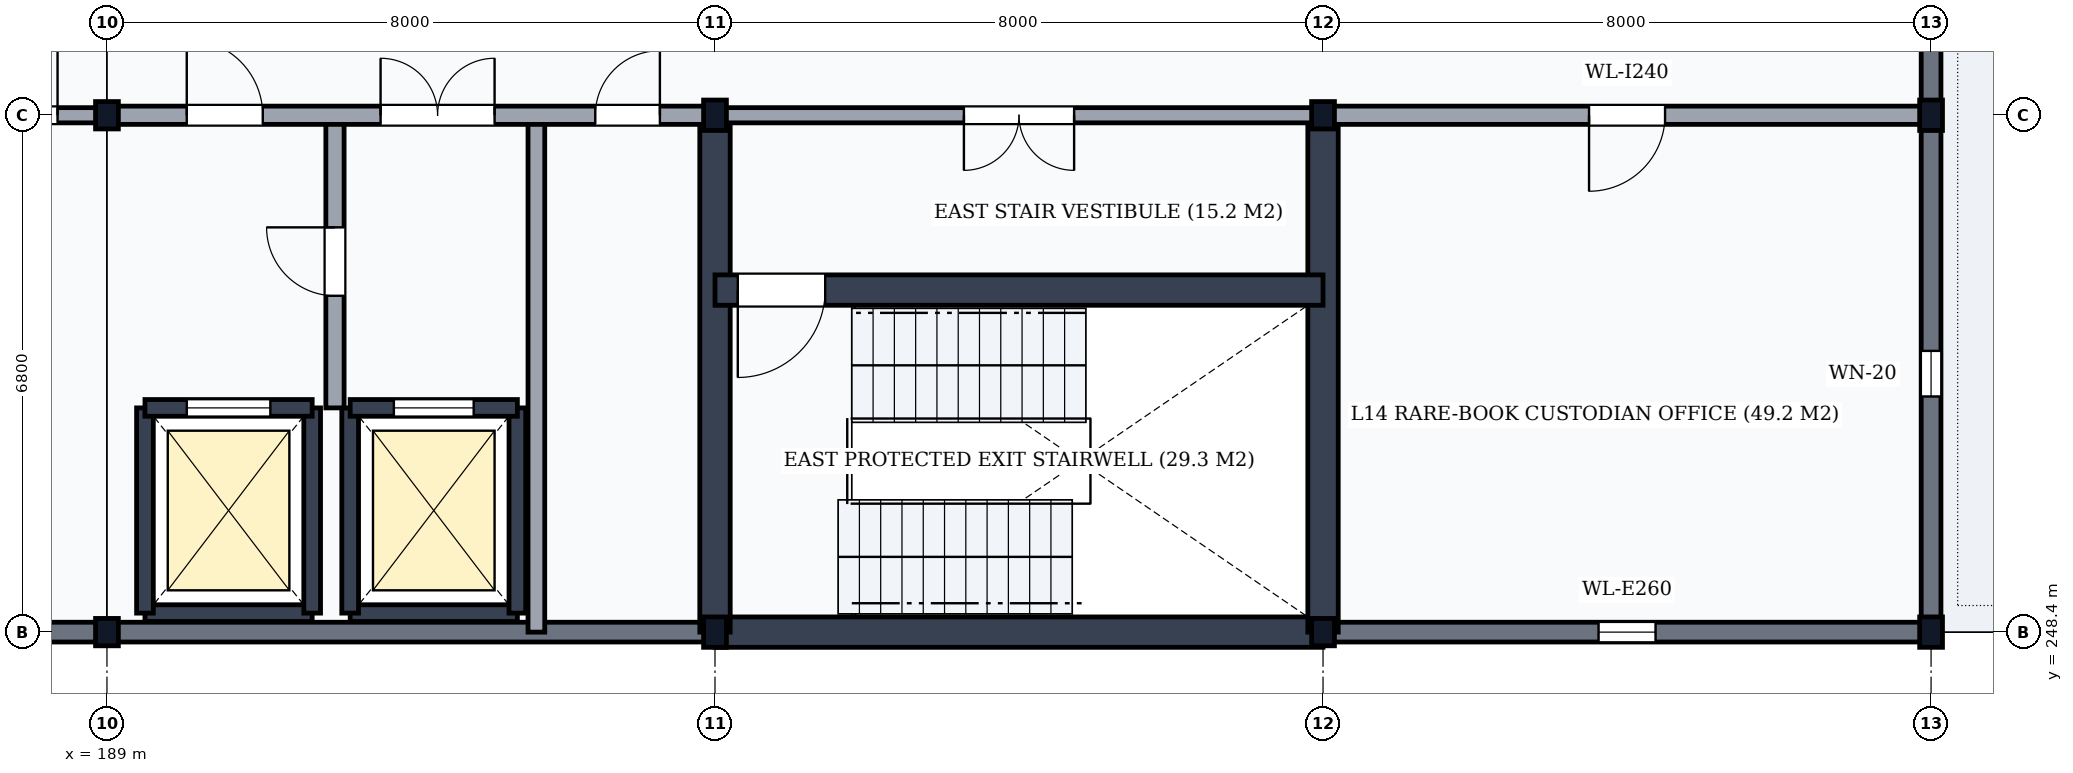
"""IFC4 building model, lengths in metres.
Left out: names, types, materials, properties, quantities, classifications, styles, units other than length and angle.
Written with IfcOpenShell. Run it as: python <this file> out.ifc"""

import sys

from ifc_helpers import new_model, si_unit, direction, frame, frame_2d, origin, origin_2d, place, context, subcontext, project, spatial, rectangle, i_section, extrude, element, fill, save


model = new_model("IFC4")
c1 = context("Model", 3, precision=1e-05, world=origin(), true_north=direction((0.0, 1.0)))
c2 = subcontext(c1, "Body", "Model", "MODEL_VIEW")
j1 = project(units=[si_unit("LENGTHUNIT", "METRE"), si_unit("PLANEANGLEUNIT", "RADIAN")], contexts=[c1])
p1 = place(None, origin())
s1 = spatial("IfcSite", under=j1, at=p1, CompositionType="ELEMENT")
p2 = place(p1, origin())
s2 = spatial("IfcBuilding", under=s1, at=p2, CompositionType="ELEMENT")
p3 = place(p2, frame((0.0, 0.0, 56.1)))
s3 = spatial("IfcBuildingStorey", under=s2, at=p3, CompositionType="ELEMENT", Elevation=56.1)
for number, where, z_axis, x_axis in (
    (1, (189.0, 248.4, 0.0), (0.0, 0.0, 1.0), (1.0, 0.0, 0.0)),
    (2, (189.0, 255.2, 0.0), (0.0, 0.0, 1.0), (1.0, 0.0, 0.0)),
):
    element("IfcColumn", number, at=place(p3, frame(where, z_axis=z_axis, x_axis=x_axis)), inside=s3, PredefinedType="COLUMN", context=c2, shape_type="SweptSolid", body=[
        extrude(i_section(OverallWidth=0.3, OverallDepth=0.36, WebThickness=0.012, FlangeThickness=0.022, FilletRadius=0.027, at=origin_2d()), origin(), (0.0, 0.0, 1.0), 3.9),
    ])
for number, where, z_axis, x_axis in (
    (3, (197.0, 248.4, 0.0), (0.0, 0.0, 1.0), (1.0, 0.0, 0.0)),
    (4, (197.0, 255.2, 0.0), (0.0, 0.0, 1.0), (1.0, 0.0, 0.0)),
):
    element("IfcColumn", number, at=place(p3, frame(where, z_axis=z_axis, x_axis=x_axis)), inside=s3, PredefinedType="COLUMN", context=c2, shape_type="SweptSolid", body=[
        extrude(i_section(OverallWidth=0.3, OverallDepth=0.4, WebThickness=0.013, FlangeThickness=0.024, FilletRadius=0.027, at=origin_2d()), origin(), (0.0, 0.0, 1.0), 3.9),
    ])
for number, where, z_axis, x_axis in (
    (5, (205.0, 248.4, 0.0), (0.0, 0.0, 1.0), (1.0, 0.0, 0.0)),
    (6, (205.0, 255.2, 0.0), (0.0, 0.0, 1.0), (1.0, 0.0, 0.0)),
):
    element("IfcColumn", number, at=place(p3, frame(where, z_axis=z_axis, x_axis=x_axis)), inside=s3, PredefinedType="COLUMN", context=c2, shape_type="SweptSolid", body=[
        extrude(i_section(OverallWidth=0.3, OverallDepth=0.36, WebThickness=0.012, FlangeThickness=0.022, FilletRadius=0.027, at=origin_2d()), origin(), (0.0, 0.0, 1.0), 3.9),
    ])
for number, where, z_axis, x_axis in (
    (7, (213.0, 248.4, 0.0), (0.0, 0.0, 1.0), (1.0, 0.0, 0.0)),
    (8, (213.0, 255.2, 0.0), (0.0, 0.0, 1.0), (1.0, 0.0, 0.0)),
):
    element("IfcColumn", number, at=place(p3, frame(where, z_axis=z_axis, x_axis=x_axis)), inside=s3, PredefinedType="COLUMN", context=c2, shape_type="SweptSolid", body=[
        extrude(i_section(OverallWidth=0.3, OverallDepth=0.4, WebThickness=0.013, FlangeThickness=0.024, FilletRadius=0.027, at=origin_2d()), origin(), (0.0, 0.0, 1.0), 3.9),
    ])
p4 = place(p3, frame((181.006, 248.4, 0.0), z_axis=(0.0, 0.0, 1.0), x_axis=(1.0, 0.0, 0.0)))
e9 = element("IfcWall", 9, at=p4, inside=s3, PredefinedType="SOLIDWALL", context=c2, shape_type="SweptSolid", body=[
    extrude(rectangle(XDim=7.988, YDim=0.26, at=frame_2d((3.994, 0.0))), origin(), (0.0, 0.0, 1.0), 3.268),
])
p5 = place(p4, frame((3.369, 0.0, 0.95)))
e10 = element("IfcOpeningElement", 10, at=p5, cuts=e9, PredefinedType="OPENING", context=c2, shape_type="SweptSolid", body=[
    extrude(rectangle(XDim=0.65, YDim=1.8, at=frame_2d((0.325, 0.9))), frame((0.0, 0.145, 0.0), z_axis=(0.0, -1.0, 0.0), x_axis=(1.0, 0.0, 0.0)), (0.0, 0.0, 1.0), 0.29),
])
p6 = place(p3, frame((189.006, 248.4, 0.0), z_axis=(0.0, 0.0, 1.0), x_axis=(1.0, 0.0, 0.0)))
e11 = element("IfcWall", 11, at=p6, inside=s3, PredefinedType="SOLIDWALL", context=c2, shape_type="SweptSolid", body=[
    extrude(rectangle(XDim=7.988, YDim=0.26, at=frame_2d((3.994, 0.0))), origin(), (0.0, 0.0, 1.0), 3.268),
])
p7 = place(p3, frame((205.006, 248.4, 0.0), z_axis=(0.0, 0.0, 1.0), x_axis=(1.0, 0.0, 0.0)))
e12 = element("IfcWall", 12, at=p7, inside=s3, PredefinedType="SOLIDWALL", context=c2, shape_type="SweptSolid", body=[
    extrude(rectangle(XDim=7.988, YDim=0.26, at=frame_2d((3.994, 0.0))), origin(), (0.0, 0.0, 1.0), 3.268),
])
p8 = place(p7, frame((3.619, 0.0, 0.95)))
e13 = element("IfcOpeningElement", 13, at=p8, cuts=e12, PredefinedType="OPENING", context=c2, shape_type="SweptSolid", body=[
    extrude(rectangle(XDim=0.75, YDim=2.0, at=frame_2d((0.375, 1.0))), frame((0.0, 0.145, 0.0), z_axis=(0.0, -1.0, 0.0), x_axis=(1.0, 0.0, 0.0)), (0.0, 0.0, 1.0), 0.29),
])
p9 = place(p3, frame((213.0, 248.406, 0.0), z_axis=(0.0, 0.0, 1.0), x_axis=(0.0, 1.0, 0.0)))
e14 = element("IfcWall", 14, at=p9, inside=s3, PredefinedType="SOLIDWALL", context=c2, shape_type="SweptSolid", body=[
    extrude(rectangle(XDim=6.788, YDim=0.26, at=frame_2d((3.394, 0.0))), origin(), (0.0, 0.0, 1.0), 3.348),
])
p10 = place(p9, frame((3.094, 0.0, 0.95)))
e15 = element("IfcOpeningElement", 15, at=p10, cuts=e14, PredefinedType="OPENING", context=c2, shape_type="SweptSolid", body=[
    extrude(rectangle(XDim=0.6, YDim=1.5, at=frame_2d((0.3, 0.75))), frame((0.0, 0.145, 0.0), z_axis=(0.0, -1.0, 0.0), x_axis=(1.0, 0.0, 0.0)), (0.0, 0.0, 1.0), 0.29),
])
p11 = place(p3, frame((213.0, 255.206, 0.0), z_axis=(0.0, 0.0, 1.0), x_axis=(0.0, 1.0, 0.0)))
e16 = element("IfcWall", 16, at=p11, inside=s3, PredefinedType="SOLIDWALL", context=c2, shape_type="SweptSolid", body=[
    extrude(rectangle(XDim=7.588, YDim=0.26, at=frame_2d((3.794, 0.0))), origin(), (0.0, 0.0, 1.0), 3.308),
])
p12 = place(p3, frame((197.0, 248.4, 0.0), z_axis=(0.0, 0.0, 1.0), x_axis=(1.0, 0.0, 0.0)))
e17 = element("IfcWall", 17, at=p12, inside=s3, PredefinedType="SHEAR", context=c2, shape_type="SweptSolid", body=[
    extrude(rectangle(XDim=8.0, YDim=0.4, at=frame_2d((4.0, 0.0))), origin(), (0.0, 0.0, 1.0), 3.58),
])
for number, where, z_axis, x_axis in (
    (18, (197.0, 248.4, 0.0), (0.0, 0.0, 1.0), (0.0, 1.0, 0.0)),
    (19, (205.0, 248.4, 0.0), (0.0, 0.0, 1.0), (0.0, 1.0, 0.0)),
):
    element("IfcWall", number, at=place(p3, frame(where, z_axis=z_axis, x_axis=x_axis)), inside=s3, PredefinedType="SHEAR", context=c2, shape_type="SweptSolid", body=[
        extrude(rectangle(XDim=6.8, YDim=0.4, at=frame_2d((3.4, 0.0))), origin(), (0.0, 0.0, 1.0), 3.58),
    ])
p13 = place(p3, frame((197.0, 252.9, 0.0), z_axis=(0.0, 0.0, 1.0), x_axis=(1.0, 0.0, 0.0)))
e20 = element("IfcWall", 20, at=p13, inside=s3, PredefinedType="SHEAR", context=c2, shape_type="SweptSolid", body=[
    extrude(rectangle(XDim=8.0, YDim=0.4, at=frame_2d((4.0, 0.0))), origin(), (0.0, 0.0, 1.0), 3.58),
])
p14 = place(p13, frame((0.3, 0.0, 0.0)))
e21 = element("IfcOpeningElement", 21, at=p14, cuts=e20, PredefinedType="OPENING", context=c2, shape_type="SweptSolid", body=[
    extrude(rectangle(XDim=1.15, YDim=2.15, at=frame_2d((0.575, 1.075))), frame((0.0, 0.215, 0.0), z_axis=(0.0, -1.0, 0.0), x_axis=(1.0, 0.0, 0.0)), (0.0, 0.0, 1.0), 0.43),
])
p15 = place(p3, frame((197.0, 255.2, 0.0), z_axis=(0.0, 0.0, 1.0), x_axis=(1.0, 0.0, 0.0)))
e22 = element("IfcWall", 22, at=p15, inside=s3, PredefinedType="PARTITIONING", context=c2, shape_type="SweptSolid", body=[
    extrude(rectangle(XDim=8.0, YDim=0.2, at=frame_2d((4.0, 0.0))), origin(), (0.0, 0.0, 1.0), 3.028),
])
p16 = place(p15, frame((3.275, 0.0, 0.0)))
e23 = element("IfcOpeningElement", 23, at=p16, cuts=e22, PredefinedType="OPENING", context=c2, shape_type="SweptSolid", body=[
    extrude(rectangle(XDim=1.45, YDim=2.2, at=frame_2d((0.725, 1.1))), frame((0.0, 0.115, 0.0), z_axis=(0.0, -1.0, 0.0), x_axis=(1.0, 0.0, 0.0)), (0.0, 0.0, 1.0), 0.23),
])
p17 = place(p3, frame((189.5, 248.65, 0.0), z_axis=(0.0, 0.0, 1.0), x_axis=(1.0, 0.0, 0.0)))
e24 = element("IfcWall", 24, at=p17, inside=s3, PredefinedType="SHEAR", context=c2, shape_type="SweptSolid", body=[
    extrude(rectangle(XDim=2.2, YDim=0.22, at=frame_2d((1.1, 0.0))), origin(), (0.0, 0.0, 1.0), 3.58),
])
for number, where, z_axis, x_axis in (
    (25, (189.5, 248.65, 0.0), (0.0, 0.0, 1.0), (0.0, 1.0, 0.0)),
    (26, (191.7, 248.65, 0.0), (0.0, 0.0, 1.0), (0.0, 1.0, 0.0)),
):
    element("IfcWall", number, at=place(p3, frame(where, z_axis=z_axis, x_axis=x_axis)), inside=s3, PredefinedType="SHEAR", context=c2, shape_type="SweptSolid", body=[
        extrude(rectangle(XDim=2.7, YDim=0.22, at=frame_2d((1.35, 0.0))), origin(), (0.0, 0.0, 1.0), 3.58),
    ])
p18 = place(p3, frame((189.5, 251.35, 0.0), z_axis=(0.0, 0.0, 1.0), x_axis=(1.0, 0.0, 0.0)))
e27 = element("IfcWall", 27, at=p18, inside=s3, PredefinedType="SHEAR", context=c2, shape_type="SweptSolid", body=[
    extrude(rectangle(XDim=2.2, YDim=0.22, at=frame_2d((1.1, 0.0))), origin(), (0.0, 0.0, 1.0), 3.58),
])
p19 = place(p18, frame((0.55, 0.0, 0.0)))
e28 = element("IfcOpeningElement", 28, at=p19, cuts=e27, PredefinedType="OPENING", context=c2, shape_type="SweptSolid", body=[
    extrude(rectangle(XDim=1.1, YDim=2.15, at=frame_2d((0.55, 1.075))), frame((0.0, 0.125, 0.0), z_axis=(0.0, -1.0, 0.0), x_axis=(1.0, 0.0, 0.0)), (0.0, 0.0, 1.0), 0.25),
])
p20 = place(p3, frame((192.2, 248.65, 0.0), z_axis=(0.0, 0.0, 1.0), x_axis=(1.0, 0.0, 0.0)))
e29 = element("IfcWall", 29, at=p20, inside=s3, PredefinedType="SHEAR", context=c2, shape_type="SweptSolid", body=[
    extrude(rectangle(XDim=2.2, YDim=0.22, at=frame_2d((1.1, 0.0))), origin(), (0.0, 0.0, 1.0), 3.58),
])
for number, where, z_axis, x_axis in (
    (30, (192.2, 248.65, 0.0), (0.0, 0.0, 1.0), (0.0, 1.0, 0.0)),
    (31, (194.4, 248.65, 0.0), (0.0, 0.0, 1.0), (0.0, 1.0, 0.0)),
):
    element("IfcWall", number, at=place(p3, frame(where, z_axis=z_axis, x_axis=x_axis)), inside=s3, PredefinedType="SHEAR", context=c2, shape_type="SweptSolid", body=[
        extrude(rectangle(XDim=2.7, YDim=0.22, at=frame_2d((1.35, 0.0))), origin(), (0.0, 0.0, 1.0), 3.58),
    ])
p21 = place(p3, frame((192.2, 251.35, 0.0), z_axis=(0.0, 0.0, 1.0), x_axis=(1.0, 0.0, 0.0)))
e32 = element("IfcWall", 32, at=p21, inside=s3, PredefinedType="SHEAR", context=c2, shape_type="SweptSolid", body=[
    extrude(rectangle(XDim=2.2, YDim=0.22, at=frame_2d((1.1, 0.0))), origin(), (0.0, 0.0, 1.0), 3.58),
])
p22 = place(p21, frame((0.575, 0.0, 0.0)))
e33 = element("IfcOpeningElement", 33, at=p22, cuts=e32, PredefinedType="OPENING", context=c2, shape_type="SweptSolid", body=[
    extrude(rectangle(XDim=1.05, YDim=2.15, at=frame_2d((0.525, 1.075))), frame((0.0, 0.125, 0.0), z_axis=(0.0, -1.0, 0.0), x_axis=(1.0, 0.0, 0.0)), (0.0, 0.0, 1.0), 0.25),
])
p23 = place(p3, frame((192.0, 251.35, 0.0), z_axis=(0.0, 0.0, 1.0), x_axis=(0.0, 1.0, 0.0)))
e34 = element("IfcWall", 34, at=p23, inside=s3, PredefinedType="PARTITIONING", context=c2, shape_type="SweptSolid", body=[
    extrude(rectangle(XDim=3.85, YDim=0.24, at=frame_2d((1.925, 0.0))), origin(), (0.0, 0.0, 1.0), 3.58),
])
p24 = place(p23, frame((1.475, 0.0, 0.0)))
e35 = element("IfcOpeningElement", 35, at=p24, cuts=e34, PredefinedType="OPENING", context=c2, shape_type="SweptSolid", body=[
    extrude(rectangle(XDim=0.9, YDim=2.1, at=frame_2d((0.45, 1.05))), frame((0.0, 0.135, 0.0), z_axis=(0.0, -1.0, 0.0), x_axis=(1.0, 0.0, 0.0)), (0.0, 0.0, 1.0), 0.27),
])
p25 = place(p3, frame((194.65, 248.4, 0.0), z_axis=(0.0, 0.0, 1.0), x_axis=(0.0, 1.0, 0.0)))
e36 = element("IfcWall", 36, at=p25, inside=s3, PredefinedType="PARTITIONING", context=c2, shape_type="SweptSolid", body=[
    extrude(rectangle(XDim=6.8, YDim=0.22, at=frame_2d((3.4, 0.0))), origin(), (0.0, 0.0, 1.0), 3.58),
])
p26 = place(p3, frame((181.0, 255.2, 0.0), z_axis=(0.0, 0.0, 1.0), x_axis=(1.0, 0.0, 0.0)))
e37 = element("IfcWall", 37, at=p26, inside=s3, PredefinedType="PARTITIONING", context=c2, shape_type="SweptSolid", body=[
    extrude(rectangle(XDim=8.0, YDim=0.2, at=frame_2d((4.0, 0.0))), origin(), (0.0, 0.0, 1.0), 3.028),
])
p27 = place(p26, frame((0.85, 0.0, 0.0)))
e38 = element("IfcOpeningElement", 38, at=p27, cuts=e37, PredefinedType="OPENING", context=c2, shape_type="SweptSolid", body=[
    extrude(rectangle(XDim=0.9, YDim=2.1, at=frame_2d((0.45, 1.05))), frame((0.0, 0.115, 0.0), z_axis=(0.0, -1.0, 0.0), x_axis=(1.0, 0.0, 0.0)), (0.0, 0.0, 1.0), 0.23),
])
p28 = place(p26, frame((3.25, 0.0, 0.0)))
e39 = element("IfcOpeningElement", 39, at=p28, cuts=e37, PredefinedType="OPENING", context=c2, shape_type="SweptSolid", body=[
    extrude(rectangle(XDim=0.9, YDim=2.1, at=frame_2d((0.45, 1.05))), frame((0.0, 0.115, 0.0), z_axis=(0.0, -1.0, 0.0), x_axis=(1.0, 0.0, 0.0)), (0.0, 0.0, 1.0), 0.23),
])
p29 = place(p26, frame((5.075, 0.0, 0.0)))
e40 = element("IfcOpeningElement", 40, at=p29, cuts=e37, PredefinedType="OPENING", context=c2, shape_type="SweptSolid", body=[
    extrude(rectangle(XDim=0.95, YDim=2.1, at=frame_2d((0.475, 1.05))), frame((0.0, 0.115, 0.0), z_axis=(0.0, -1.0, 0.0), x_axis=(1.0, 0.0, 0.0)), (0.0, 0.0, 1.0), 0.23),
])
p30 = place(p26, frame((6.5, 0.0, 0.0)))
e41 = element("IfcOpeningElement", 41, at=p30, cuts=e37, PredefinedType="OPENING", context=c2, shape_type="SweptSolid", body=[
    extrude(rectangle(XDim=0.85, YDim=2.1, at=frame_2d((0.425, 1.05))), frame((0.0, 0.115, 0.0), z_axis=(0.0, -1.0, 0.0), x_axis=(1.0, 0.0, 0.0)), (0.0, 0.0, 1.0), 0.23),
])
p31 = place(p3, frame((189.0, 255.2, 0.0), z_axis=(0.0, 0.0, 1.0), x_axis=(1.0, 0.0, 0.0)))
e42 = element("IfcWall", 42, at=p31, inside=s3, PredefinedType="PARTITIONING", context=c2, shape_type="SweptSolid", body=[
    extrude(rectangle(XDim=8.0, YDim=0.24, at=frame_2d((4.0, 0.0))), origin(), (0.0, 0.0, 1.0), 3.028),
])
p32 = place(p31, frame((1.05, 0.0, 0.0)))
e43 = element("IfcOpeningElement", 43, at=p32, cuts=e42, PredefinedType="OPENING", context=c2, shape_type="SweptSolid", body=[
    extrude(rectangle(XDim=1.0, YDim=2.1, at=frame_2d((0.5, 1.05))), frame((0.0, 0.135, 0.0), z_axis=(0.0, -1.0, 0.0), x_axis=(1.0, 0.0, 0.0)), (0.0, 0.0, 1.0), 0.27),
])
p33 = place(p31, frame((3.6, 0.0, 0.0)))
e44 = element("IfcOpeningElement", 44, at=p33, cuts=e42, PredefinedType="OPENING", context=c2, shape_type="SweptSolid", body=[
    extrude(rectangle(XDim=1.5, YDim=2.25, at=frame_2d((0.75, 1.125))), frame((0.0, 0.135, 0.0), z_axis=(0.0, -1.0, 0.0), x_axis=(1.0, 0.0, 0.0)), (0.0, 0.0, 1.0), 0.27),
])
p34 = place(p31, frame((6.425, 0.0, 0.0)))
e45 = element("IfcOpeningElement", 45, at=p34, cuts=e42, PredefinedType="OPENING", context=c2, shape_type="SweptSolid", body=[
    extrude(rectangle(XDim=0.85, YDim=2.1, at=frame_2d((0.425, 1.05))), frame((0.0, 0.135, 0.0), z_axis=(0.0, -1.0, 0.0), x_axis=(1.0, 0.0, 0.0)), (0.0, 0.0, 1.0), 0.27),
])
p35 = place(p3, frame((205.0, 255.2, 0.0), z_axis=(0.0, 0.0, 1.0), x_axis=(1.0, 0.0, 0.0)))
e46 = element("IfcWall", 46, at=p35, inside=s3, PredefinedType="PARTITIONING", context=c2, shape_type="SweptSolid", body=[
    extrude(rectangle(XDim=8.0, YDim=0.24, at=frame_2d((4.0, 0.0))), origin(), (0.0, 0.0, 1.0), 3.028),
])
p36 = place(p35, frame((3.5, 0.0, 0.0)))
e47 = element("IfcOpeningElement", 47, at=p36, cuts=e46, PredefinedType="OPENING", context=c2, shape_type="SweptSolid", body=[
    extrude(rectangle(XDim=1.0, YDim=2.1, at=frame_2d((0.5, 1.05))), frame((0.0, 0.135, 0.0), z_axis=(0.0, -1.0, 0.0), x_axis=(1.0, 0.0, 0.0)), (0.0, 0.0, 1.0), 0.27),
])
p37 = place(p8, origin())
e48 = element("IfcWindow", 48, at=p37, inside=s3, PartitioningType="SINGLE_PANEL", PredefinedType="WINDOW", context=c2, shape_type="SweptSolid", body=[
    extrude(rectangle(XDim=0.75, YDim=2.0, at=frame_2d((0.375, 1.0))), frame((0.0, 0.03, 0.0), z_axis=(0.0, -1.0, 0.0), x_axis=(1.0, 0.0, 0.0)), (0.0, 0.0, 1.0), 0.06),
])
fill(e13, e48)
p38 = place(p10, origin())
e49 = element("IfcWindow", 49, at=p38, inside=s3, PartitioningType="SINGLE_PANEL", PredefinedType="WINDOW", context=c2, shape_type="SweptSolid", body=[
    extrude(rectangle(XDim=0.6, YDim=1.5, at=frame_2d((0.3, 0.75))), frame((0.0, 0.03, 0.0), z_axis=(0.0, -1.0, 0.0), x_axis=(1.0, 0.0, 0.0)), (0.0, 0.0, 1.0), 0.06),
])
fill(e15, e49)
p39 = place(p14, frame((1.15, 0.0, 0.0), z_axis=(0.0, 0.0, 1.0), x_axis=(-1.0, 0.0, 0.0)))
e50 = element("IfcDoor", 50, at=p39, inside=s3, OperationType="SINGLE_SWING_RIGHT", PredefinedType="DOOR", context=c2, shape_type="SweptSolid", body=[
    extrude(rectangle(XDim=1.15, YDim=2.15, at=frame_2d((0.575, 1.075))), frame((0.0, 0.025, 0.0), z_axis=(0.0, -1.0, 0.0), x_axis=(1.0, 0.0, 0.0)), (0.0, 0.0, 1.0), 0.05),
])
fill(e21, e50)
p40 = place(p16, frame((1.45, 0.0, 0.0), z_axis=(0.0, 0.0, 1.0), x_axis=(-1.0, 0.0, 0.0)))
e51 = element("IfcDoor", 51, at=p40, inside=s3, OperationType="DOUBLE_DOOR_SINGLE_SWING", PredefinedType="DOOR", context=c2, shape_type="SweptSolid", body=[
    extrude(rectangle(XDim=1.45, YDim=2.2, at=frame_2d((0.725, 1.1))), frame((0.0, 0.025, 0.0), z_axis=(0.0, -1.0, 0.0), x_axis=(1.0, 0.0, 0.0)), (0.0, 0.0, 1.0), 0.05),
])
fill(e23, e51)
p41 = place(p19, origin())
e52 = element("IfcDoor", 52, at=p41, inside=s3, OperationType="DOUBLE_DOOR_SLIDING", PredefinedType="USERDEFINED", context=c2, shape_type="SweptSolid", body=[
    extrude(rectangle(XDim=1.1, YDim=2.15, at=frame_2d((0.55, 1.075))), frame((0.0, 0.025, 0.0), z_axis=(0.0, -1.0, 0.0), x_axis=(1.0, 0.0, 0.0)), (0.0, 0.0, 1.0), 0.05),
])
fill(e28, e52)
p42 = place(p22, origin())
e53 = element("IfcDoor", 53, at=p42, inside=s3, OperationType="DOUBLE_DOOR_SLIDING", PredefinedType="USERDEFINED", context=c2, shape_type="SweptSolid", body=[
    extrude(rectangle(XDim=1.05, YDim=2.15, at=frame_2d((0.525, 1.075))), frame((0.0, 0.025, 0.0), z_axis=(0.0, -1.0, 0.0), x_axis=(1.0, 0.0, 0.0)), (0.0, 0.0, 1.0), 0.05),
])
fill(e33, e53)
p43 = place(p24, frame((0.9, 0.0, 0.0), z_axis=(0.0, 0.0, 1.0), x_axis=(-1.0, 0.0, 0.0)))
e54 = element("IfcDoor", 54, at=p43, inside=s3, OperationType="SINGLE_SWING_LEFT", PredefinedType="DOOR", context=c2, shape_type="SweptSolid", body=[
    extrude(rectangle(XDim=0.9, YDim=2.1, at=frame_2d((0.45, 1.05))), frame((0.0, 0.025, 0.0), z_axis=(0.0, -1.0, 0.0), x_axis=(1.0, 0.0, 0.0)), (0.0, 0.0, 1.0), 0.05),
])
fill(e35, e54)
p44 = place(p30, frame((0.85, 0.0, 0.0), z_axis=(0.0, 0.0, 1.0), x_axis=(-1.0, 0.0, 0.0)))
e55 = element("IfcDoor", 55, at=p44, inside=s3, OperationType="SINGLE_SWING_LEFT", PredefinedType="DOOR", context=c2, shape_type="SweptSolid", body=[
    extrude(rectangle(XDim=0.85, YDim=2.1, at=frame_2d((0.425, 1.05))), frame((0.0, 0.025, 0.0), z_axis=(0.0, -1.0, 0.0), x_axis=(1.0, 0.0, 0.0)), (0.0, 0.0, 1.0), 0.05),
])
fill(e41, e55)
p45 = place(p32, origin())
e56 = element("IfcDoor", 56, at=p45, inside=s3, OperationType="SINGLE_SWING_LEFT", PredefinedType="DOOR", context=c2, shape_type="SweptSolid", body=[
    extrude(rectangle(XDim=1.0, YDim=2.1, at=frame_2d((0.5, 1.05))), frame((0.0, 0.025, 0.0), z_axis=(0.0, -1.0, 0.0), x_axis=(1.0, 0.0, 0.0)), (0.0, 0.0, 1.0), 0.05),
])
fill(e43, e56)
p46 = place(p33, origin())
e57 = element("IfcDoor", 57, at=p46, inside=s3, OperationType="DOUBLE_DOOR_SINGLE_SWING", PredefinedType="DOOR", context=c2, shape_type="SweptSolid", body=[
    extrude(rectangle(XDim=1.5, YDim=2.25, at=frame_2d((0.75, 1.125))), frame((0.0, 0.025, 0.0), z_axis=(0.0, -1.0, 0.0), x_axis=(1.0, 0.0, 0.0)), (0.0, 0.0, 1.0), 0.05),
])
fill(e44, e57)
p47 = place(p34, frame((0.85, 0.0, 0.0), z_axis=(0.0, 0.0, 1.0), x_axis=(-1.0, 0.0, 0.0)))
e58 = element("IfcDoor", 58, at=p47, inside=s3, OperationType="SINGLE_SWING_LEFT", PredefinedType="DOOR", context=c2, shape_type="SweptSolid", body=[
    extrude(rectangle(XDim=0.85, YDim=2.1, at=frame_2d((0.425, 1.05))), frame((0.0, 0.025, 0.0), z_axis=(0.0, -1.0, 0.0), x_axis=(1.0, 0.0, 0.0)), (0.0, 0.0, 1.0), 0.05),
])
fill(e45, e58)
p48 = place(p36, frame((1.0, 0.0, 0.0), z_axis=(0.0, 0.0, 1.0), x_axis=(-1.0, 0.0, 0.0)))
e59 = element("IfcDoor", 59, at=p48, inside=s3, OperationType="SINGLE_SWING_RIGHT", PredefinedType="DOOR", context=c2, shape_type="SweptSolid", body=[
    extrude(rectangle(XDim=1.0, YDim=2.1, at=frame_2d((0.5, 1.05))), frame((0.0, 0.025, 0.0), z_axis=(0.0, -1.0, 0.0), x_axis=(1.0, 0.0, 0.0)), (0.0, 0.0, 1.0), 0.05),
])
fill(e47, e59)
save(model, sys.argv[1])
